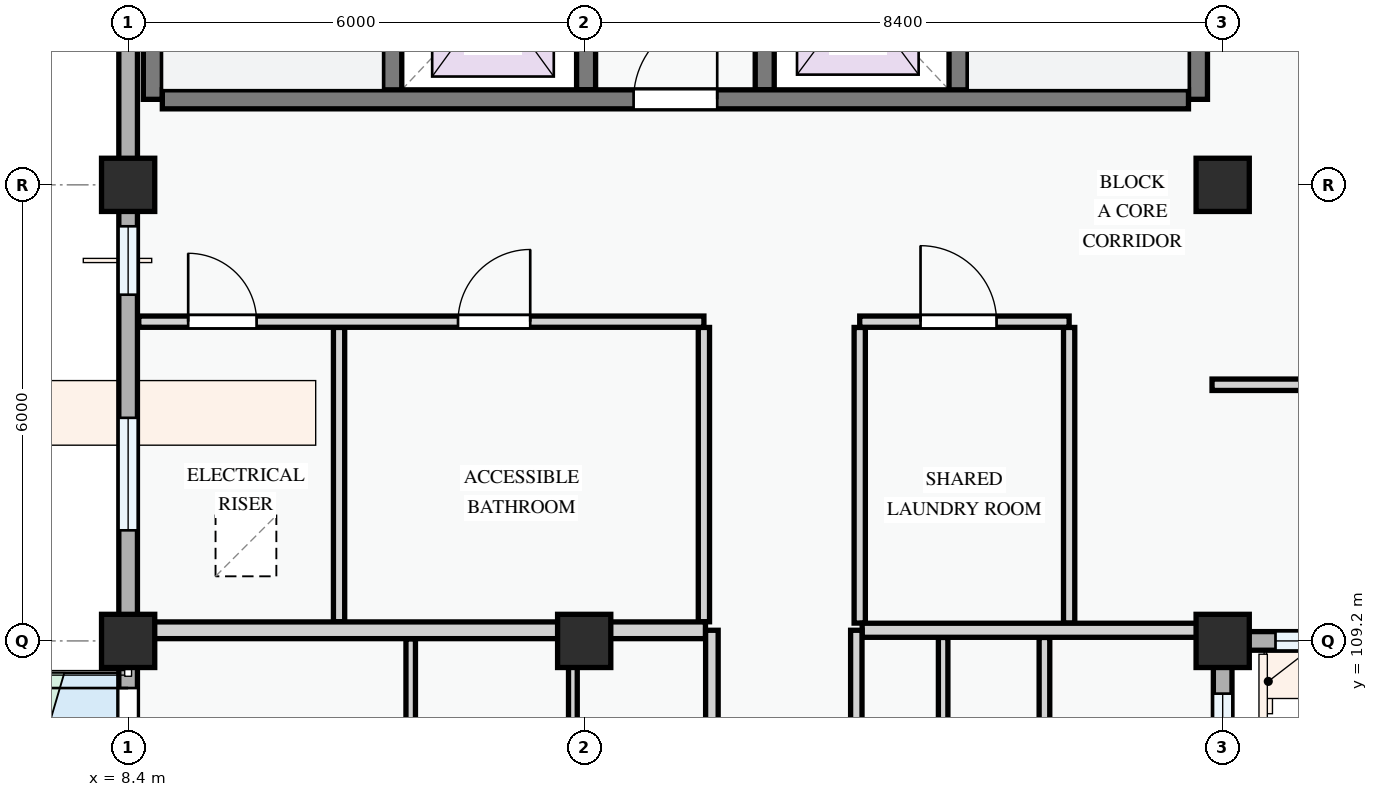
"""IFC4 building model, lengths in metres.
Left out: names, types, materials, properties, quantities, classifications, styles, units other than length and angle.
Written with IfcOpenShell. Run it as: python <this file> out.ifc"""

import sys

from ifc_helpers import new_model, si_unit, direction, frame, frame_2d, origin, origin_2d, place, context, subcontext, project, spatial, rectangle, extrude, element, fill, save


model = new_model("IFC4")
c1 = context("Model", 3, precision=1e-05, world=origin(), true_north=direction((0.0, 1.0)))
c2 = subcontext(c1, "Body", "Model", "MODEL_VIEW")
j1 = project(units=[si_unit("LENGTHUNIT", "METRE"), si_unit("PLANEANGLEUNIT", "RADIAN")], contexts=[c1])
p1 = place(None, origin())
s1 = spatial("IfcSite", under=j1, at=p1, CompositionType="ELEMENT")
p2 = place(p1, origin())
s2 = spatial("IfcBuilding", under=s1, at=p2, CompositionType="ELEMENT")
p3 = place(p2, frame((0.0, 0.0, 8.1)))
s3 = spatial("IfcBuildingStorey", under=s2, at=p3, CompositionType="ELEMENT", Elevation=8.1)
for number, where, z_axis, x_axis in (
    (1, (8.4, 109.2, 0.0), (0.0, 0.0, 1.0), (1.0, 0.0, 0.0)),
    (2, (8.4, 115.2, 0.0), (0.0, 0.0, 1.0), (1.0, 0.0, 0.0)),
    (3, (14.4, 109.2, 0.0), (0.0, 0.0, 1.0), (1.0, 0.0, 0.0)),
    (4, (22.8, 109.2, 0.0), (0.0, 0.0, 1.0), (1.0, 0.0, 0.0)),
    (5, (22.8, 115.2, 0.0), (0.0, 0.0, 1.0), (1.0, 0.0, 0.0)),
):
    element("IfcColumn", number, at=place(p3, frame(where, z_axis=z_axis, x_axis=x_axis)), inside=s3, PredefinedType="COLUMN", context=c2, shape_type="SweptSolid", body=[
        extrude(rectangle(XDim=0.7, YDim=0.7, at=origin_2d()), origin(), (0.0, 0.0, 1.0), 3.3),
    ])
p4 = place(p3, frame((22.8, 109.2, 0.0), z_axis=(0.0, 0.0, 1.0), x_axis=(1.0, 0.0, 0.0)))
e6 = element("IfcWall", 6, at=p4, inside=s3, PredefinedType="STANDARD", context=c2, shape_type="SweptSolid", body=[
    extrude(rectangle(XDim=6.0, YDim=0.245, at=frame_2d((3.0, 0.0))), origin(), (0.0, 0.0, 1.0), 2.475),
])
p5 = place(p4, frame((0.695, 0.0, 0.78)))
e7 = element("IfcOpeningElement", 7, at=p5, cuts=e6, PredefinedType="OPENING", context=c2, shape_type="SweptSolid", body=[
    extrude(rectangle(XDim=1.15, YDim=1.25, at=frame_2d((0.575, 0.625))), frame((0.0, 0.133, 0.0), z_axis=(0.0, -1.0, 0.0), x_axis=(1.0, 0.0, 0.0)), (0.0, 0.0, 1.0), 0.265),
])
p6 = place(p4, frame((3.205, 0.0, 0.78)))
e8 = element("IfcOpeningElement", 8, at=p6, cuts=e6, PredefinedType="OPENING", context=c2, shape_type="SweptSolid", body=[
    extrude(rectangle(XDim=1.75, YDim=1.45, at=frame_2d((0.875, 0.725))), frame((0.0, 0.133, 0.0), z_axis=(0.0, -1.0, 0.0), x_axis=(1.0, 0.0, 0.0)), (0.0, 0.0, 1.0), 0.265),
])
p7 = place(p3, frame((8.4, 123.6, 0.0), z_axis=(0.0, 0.0, 1.0), x_axis=(0.0, -1.0, 0.0)))
e9 = element("IfcWall", 9, at=p7, inside=s3, PredefinedType="STANDARD", context=c2, shape_type="SweptSolid", body=[
    extrude(rectangle(XDim=8.4, YDim=0.245, at=frame_2d((4.2, 0.0))), origin(), (0.0, 0.0, 1.0), 2.345),
])
p8 = place(p7, frame((0.976, 0.0, 0.78)))
e10 = element("IfcOpeningElement", 10, at=p8, cuts=e9, PredefinedType="OPENING", context=c2, shape_type="SweptSolid", body=[
    extrude(rectangle(XDim=2.04, YDim=1.46, at=frame_2d((1.02, 0.73))), frame((0.0, 0.133, 0.0), z_axis=(0.0, -1.0, 0.0), x_axis=(1.0, 0.0, 0.0)), (0.0, 0.0, 1.0), 0.265),
])
p9 = place(p7, frame((4.869, 0.0, 0.78)))
e11 = element("IfcOpeningElement", 11, at=p9, cuts=e9, PredefinedType="OPENING", context=c2, shape_type="SweptSolid", body=[
    extrude(rectangle(XDim=1.2, YDim=1.35, at=frame_2d((0.6, 0.675))), frame((0.0, 0.133, 0.0), z_axis=(0.0, -1.0, 0.0), x_axis=(1.0, 0.0, 0.0)), (0.0, 0.0, 1.0), 0.265),
])
p10 = place(p3, frame((8.4, 115.2, 0.0), z_axis=(0.0, 0.0, 1.0), x_axis=(0.0, -1.0, 0.0)))
e12 = element("IfcWall", 12, at=p10, inside=s3, PredefinedType="STANDARD", context=c2, shape_type="SweptSolid", body=[
    extrude(rectangle(XDim=6.0, YDim=0.245, at=frame_2d((3.0, 0.0))), origin(), (0.0, 0.0, 1.0), 2.445),
])
p11 = place(p10, frame((0.545, 0.0, 0.78)))
e13 = element("IfcOpeningElement", 13, at=p11, cuts=e12, PredefinedType="OPENING", context=c2, shape_type="SweptSolid", body=[
    extrude(rectangle(XDim=0.9, YDim=1.2, at=frame_2d((0.45, 0.6))), frame((0.0, 0.133, 0.0), z_axis=(0.0, -1.0, 0.0), x_axis=(1.0, 0.0, 0.0)), (0.0, 0.0, 1.0), 0.265),
])
p12 = place(p10, frame((3.065, 0.0, 0.78)))
e14 = element("IfcOpeningElement", 14, at=p12, cuts=e12, PredefinedType="OPENING", context=c2, shape_type="SweptSolid", body=[
    extrude(rectangle(XDim=1.48, YDim=1.52, at=frame_2d((0.74, 0.76))), frame((0.0, 0.133, 0.0), z_axis=(0.0, -1.0, 0.0), x_axis=(1.0, 0.0, 0.0)), (0.0, 0.0, 1.0), 0.265),
])
p13 = place(p3, frame((8.4, 109.2, 0.0), z_axis=(0.0, 0.0, 1.0), x_axis=(0.0, -1.0, 0.0)))
e15 = element("IfcWall", 15, at=p13, inside=s3, PredefinedType="STANDARD", context=c2, shape_type="SweptSolid", body=[
    extrude(rectangle(XDim=8.4, YDim=0.245, at=frame_2d((4.2, 0.0))), origin(), (0.0, 0.0, 1.0), 2.345),
])
p14 = place(p13, frame((0.62, 0.0, 0.0)))
e16 = element("IfcOpeningElement", 16, at=p14, cuts=e15, PredefinedType="OPENING", context=c2, shape_type="SweptSolid", body=[
    extrude(rectangle(XDim=1.3, YDim=2.15, at=frame_2d((0.65, 1.075))), frame((0.0, 0.133, 0.0), z_axis=(0.0, -1.0, 0.0), x_axis=(1.0, 0.0, 0.0)), (0.0, 0.0, 1.0), 0.265),
])
p15 = place(p13, frame((3.198, 0.0, 0.78)))
e17 = element("IfcOpeningElement", 17, at=p15, cuts=e15, PredefinedType="OPENING", context=c2, shape_type="SweptSolid", body=[
    extrude(rectangle(XDim=1.4, YDim=1.45, at=frame_2d((0.7, 0.725))), frame((0.0, 0.133, 0.0), z_axis=(0.0, -1.0, 0.0), x_axis=(1.0, 0.0, 0.0)), (0.0, 0.0, 1.0), 0.265),
])
p16 = place(p13, frame((6.492, 0.0, 0.78)))
e18 = element("IfcOpeningElement", 18, at=p16, cuts=e15, PredefinedType="OPENING", context=c2, shape_type="SweptSolid", body=[
    extrude(rectangle(XDim=1.05, YDim=1.2, at=frame_2d((0.525, 0.6))), frame((0.0, 0.133, 0.0), z_axis=(0.0, -1.0, 0.0), x_axis=(1.0, 0.0, 0.0)), (0.0, 0.0, 1.0), 0.265),
])
p17 = place(p3, frame((22.8, 100.8, 0.0), z_axis=(0.0, 0.0, 1.0), x_axis=(0.0, 1.0, 0.0)))
e19 = element("IfcWall", 19, at=p17, inside=s3, PredefinedType="STANDARD", context=c2, shape_type="SweptSolid", body=[
    extrude(rectangle(XDim=8.4, YDim=0.245, at=frame_2d((4.2, 0.0))), origin(), (0.0, 0.0, 1.0), 2.425),
])
p18 = place(p17, frame((0.663, 0.0, 0.78)))
e20 = element("IfcOpeningElement", 20, at=p18, cuts=e19, PredefinedType="OPENING", context=c2, shape_type="SweptSolid", body=[
    extrude(rectangle(XDim=1.2, YDim=1.5, at=frame_2d((0.6, 0.75))), frame((0.0, 0.133, 0.0), z_axis=(0.0, -1.0, 0.0), x_axis=(1.0, 0.0, 0.0)), (0.0, 0.0, 1.0), 0.265),
])
p19 = place(p17, frame((3.19, 0.0, 0.78)))
e21 = element("IfcOpeningElement", 21, at=p19, cuts=e19, PredefinedType="OPENING", context=c2, shape_type="SweptSolid", body=[
    extrude(rectangle(XDim=1.3, YDim=1.4, at=frame_2d((0.65, 0.7))), frame((0.0, 0.133, 0.0), z_axis=(0.0, -1.0, 0.0), x_axis=(1.0, 0.0, 0.0)), (0.0, 0.0, 1.0), 0.265),
])
p20 = place(p17, frame((5.707, 0.0, 0.78)))
e22 = element("IfcOpeningElement", 22, at=p20, cuts=e19, PredefinedType="OPENING", context=c2, shape_type="SweptSolid", body=[
    extrude(rectangle(XDim=2.0, YDim=1.5, at=frame_2d((1.0, 0.75))), frame((0.0, 0.133, 0.0), z_axis=(0.0, -1.0, 0.0), x_axis=(1.0, 0.0, 0.0)), (0.0, 0.0, 1.0), 0.265),
])
p21 = place(p3, frame((11.875, 123.25, 0.0), z_axis=(0.0, 0.0, 1.0), x_axis=(0.0, -1.0, 0.0)))
e23 = element("IfcWall", 23, at=p21, inside=s3, PredefinedType="SHEAR", context=c2, shape_type="SweptSolid", body=[
    extrude(rectangle(XDim=6.925, YDim=0.25, at=frame_2d((3.462, 0.0))), origin(), (0.0, 0.0, 1.0), 3.0),
])
p22 = place(p21, frame((0.35, 0.0, 0.0)))
e24 = element("IfcOpeningElement", 24, at=p22, cuts=e23, PredefinedType="OPENING", context=c2, shape_type="SweptSolid", body=[
    extrude(rectangle(XDim=0.95, YDim=2.1, at=frame_2d((0.475, 1.05))), frame((0.0, 0.135, 0.0), z_axis=(0.0, -1.0, 0.0), x_axis=(1.0, 0.0, 0.0)), (0.0, 0.0, 1.0), 0.27),
])
p23 = place(p3, frame((8.725, 123.4, 0.0), z_axis=(0.0, 0.0, 1.0), x_axis=(0.0, -1.0, 0.0)))
e25 = element("IfcWall", 25, at=p23, inside=s3, PredefinedType="SHEAR", context=c2, shape_type="SweptSolid", body=[
    extrude(rectangle(XDim=7.075, YDim=0.25, at=frame_2d((3.538, 0.0))), origin(), (0.0, 0.0, 1.0), 3.0),
])
p24 = place(p3, frame((22.475, 123.25, 0.0), z_axis=(0.0, 0.0, 1.0), x_axis=(0.0, -1.0, 0.0)))
e26 = element("IfcWall", 26, at=p24, inside=s3, PredefinedType="SHEAR", context=c2, shape_type="SweptSolid", body=[
    extrude(rectangle(XDim=6.925, YDim=0.25, at=frame_2d((3.462, 0.0))), origin(), (0.0, 0.0, 1.0), 3.0),
])
p25 = place(p3, frame((19.325, 123.25, 0.0), z_axis=(0.0, 0.0, 1.0), x_axis=(0.0, -1.0, 0.0)))
e27 = element("IfcWall", 27, at=p25, inside=s3, PredefinedType="SHEAR", context=c2, shape_type="SweptSolid", body=[
    extrude(rectangle(XDim=6.925, YDim=0.25, at=frame_2d((3.462, 0.0))), origin(), (0.0, 0.0, 1.0), 3.0),
])
p26 = place(p25, frame((0.35, 0.0, 0.0)))
e28 = element("IfcOpeningElement", 28, at=p26, cuts=e27, PredefinedType="OPENING", context=c2, shape_type="SweptSolid", body=[
    extrude(rectangle(XDim=0.95, YDim=2.1, at=frame_2d((0.475, 1.05))), frame((0.0, 0.135, 0.0), z_axis=(0.0, -1.0, 0.0), x_axis=(1.0, 0.0, 0.0)), (0.0, 0.0, 1.0), 0.27),
])
for number, where, z_axis, x_axis in (
    (29, (14.425, 118.875, 0.0), (0.0, 0.0, 1.0), (0.0, -1.0, 0.0)),
    (30, (16.775, 118.875, 0.0), (0.0, 0.0, 1.0), (0.0, -1.0, 0.0)),
):
    element("IfcWall", number, at=place(p3, frame(where, z_axis=z_axis, x_axis=x_axis)), inside=s3, PredefinedType="SHEAR", context=c2, shape_type="SweptSolid", body=[
        extrude(rectangle(XDim=2.425, YDim=0.25, at=frame_2d((1.212, 0.0))), origin(), (0.0, 0.0, 1.0), 3.0),
    ])
p27 = place(p3, frame((8.85, 116.325, 0.0), z_axis=(0.0, 0.0, 1.0), x_axis=(1.0, 0.0, 0.0)))
e31 = element("IfcWall", 31, at=p27, inside=s3, PredefinedType="SHEAR", context=c2, shape_type="SweptSolid", body=[
    extrude(rectangle(XDim=13.5, YDim=0.25, at=frame_2d((6.75, 0.0))), origin(), (0.0, 0.0, 1.0), 3.0),
])
p28 = place(p27, frame((6.2, 0.0, 0.0)))
e32 = element("IfcOpeningElement", 32, at=p28, cuts=e31, PredefinedType="OPENING", context=c2, shape_type="SweptSolid", body=[
    extrude(rectangle(XDim=1.1, YDim=2.15, at=frame_2d((0.55, 1.075))), frame((0.0, 0.135, 0.0), z_axis=(0.0, -1.0, 0.0), x_axis=(1.0, 0.0, 0.0)), (0.0, 0.0, 1.0), 0.27),
])
for number, where, z_axis, x_axis in (
    (33, (11.175, 113.324, 0.0), (0.0, 0.0, 1.0), (0.0, -1.0, 0.0)),
    (34, (15.975, 113.324, 0.0), (0.0, 0.0, 1.0), (0.0, -1.0, 0.0)),
):
    element("IfcWall", number, at=place(p3, frame(where, z_axis=z_axis, x_axis=x_axis)), inside=s3, PredefinedType="PARTITIONING", context=c2, shape_type="SweptSolid", body=[
        extrude(rectangle(XDim=3.872, YDim=0.148, at=frame_2d((1.936, 0.0))), origin(), (0.0, 0.0, 1.0), 3.0),
    ])
for number, where, z_axis, x_axis in (
    (35, (18.025, 113.324, 0.0), (0.0, 0.0, 1.0), (0.0, -1.0, 0.0)),
    (36, (20.78, 113.324, 0.0), (0.0, 0.0, 1.0), (0.0, -1.0, 0.0)),
):
    element("IfcWall", number, at=place(p3, frame(where, z_axis=z_axis, x_axis=x_axis)), inside=s3, PredefinedType="PARTITIONING", context=c2, shape_type="SweptSolid", body=[
        extrude(rectangle(XDim=3.889, YDim=0.148, at=frame_2d((1.945, 0.0))), origin(), (0.0, 0.0, 1.0), 3.0),
    ])
p29 = place(p3, frame((8.54, 113.4, 0.0), z_axis=(0.0, 0.0, 1.0), x_axis=(1.0, 0.0, 0.0)))
e37 = element("IfcWall", 37, at=p29, inside=s3, PredefinedType="PARTITIONING", context=c2, shape_type="SweptSolid", body=[
    extrude(rectangle(XDim=7.435, YDim=0.148, at=frame_2d((3.718, 0.0))), origin(), (0.0, 0.0, 1.0), 3.0),
])
p30 = place(p29, frame((0.65, 0.0, 0.0)))
e38 = element("IfcOpeningElement", 38, at=p30, cuts=e37, PredefinedType="OPENING", context=c2, shape_type="SweptSolid", body=[
    extrude(rectangle(XDim=0.9, YDim=2.1, at=frame_2d((0.45, 1.05))), frame((0.0, 0.084, 0.0), z_axis=(0.0, -1.0, 0.0), x_axis=(1.0, 0.0, 0.0)), (0.0, 0.0, 1.0), 0.168),
])
p31 = place(p29, frame((4.2, 0.0, 0.0)))
e39 = element("IfcOpeningElement", 39, at=p31, cuts=e37, PredefinedType="OPENING", context=c2, shape_type="SweptSolid", body=[
    extrude(rectangle(XDim=0.95, YDim=2.1, at=frame_2d((0.475, 1.05))), frame((0.0, 0.084, 0.0), z_axis=(0.0, -1.0, 0.0), x_axis=(1.0, 0.0, 0.0)), (0.0, 0.0, 1.0), 0.168),
])
p32 = place(p3, frame((18.025, 113.4, 0.0), z_axis=(0.0, 0.0, 1.0), x_axis=(1.0, 0.0, 0.0)))
e40 = element("IfcWall", 40, at=p32, inside=s3, PredefinedType="PARTITIONING", context=c2, shape_type="SweptSolid", body=[
    extrude(rectangle(XDim=2.755, YDim=0.148, at=frame_2d((1.377, 0.0))), origin(), (0.0, 0.0, 1.0), 3.0),
])
p33 = place(p32, frame((0.8, 0.0, 0.0)))
e41 = element("IfcOpeningElement", 41, at=p33, cuts=e40, PredefinedType="OPENING", context=c2, shape_type="SweptSolid", body=[
    extrude(rectangle(XDim=1.0, YDim=2.15, at=frame_2d((0.5, 1.075))), frame((0.0, 0.084, 0.0), z_axis=(0.0, -1.0, 0.0), x_axis=(1.0, 0.0, 0.0)), (0.0, 0.0, 1.0), 0.168),
])
p34 = place(p3, frame((22.66, 112.57, 0.0), z_axis=(0.0, 0.0, 1.0), x_axis=(1.0, 0.0, 0.0)))
e42 = element("IfcWall", 42, at=p34, inside=s3, PredefinedType="PARTITIONING", context=c2, shape_type="SweptSolid", body=[
    extrude(rectangle(XDim=2.406, YDim=0.15, at=frame_2d((1.203, 0.0))), origin(), (0.0, 0.0, 1.0), 3.0),
])
p35 = place(p3, frame((12.118, 103.447, 0.0), z_axis=(0.0, 0.0, 1.0), x_axis=(0.0, 1.0, 0.0)))
e43 = element("IfcWall", 43, at=p35, inside=s3, PredefinedType="PARTITIONING", context=c2, shape_type="SweptSolid", body=[
    extrude(rectangle(XDim=5.781, YDim=0.125, at=frame_2d((2.891, 0.0))), origin(), (0.0, 0.0, 1.0), 3.0),
])
p36 = place(p3, frame((14.251, 103.447, 0.0), z_axis=(0.0, 0.0, 1.0), x_axis=(0.0, 1.0, 0.0)))
e44 = element("IfcWall", 44, at=p36, inside=s3, PredefinedType="PARTITIONING", context=c2, shape_type="SweptSolid", body=[
    extrude(rectangle(XDim=5.781, YDim=0.115, at=frame_2d((2.891, 0.0))), origin(), (0.0, 0.0, 1.0), 2.425),
])
p37 = place(p3, frame((20.455, 103.188, 0.0), z_axis=(0.0, 0.0, 1.0), x_axis=(0.0, 1.0, 0.0)))
e45 = element("IfcWall", 45, at=p37, inside=s3, PredefinedType="PARTITIONING", context=c2, shape_type="SweptSolid", body=[
    extrude(rectangle(XDim=6.057, YDim=0.14, at=frame_2d((3.029, 0.0))), origin(), (0.0, 0.0, 1.0), 3.0),
])
p38 = place(p3, frame((19.122, 103.188, 0.0), z_axis=(0.0, 0.0, 1.0), x_axis=(0.0, 1.0, 0.0)))
e46 = element("IfcWall", 46, at=p38, inside=s3, PredefinedType="PARTITIONING", context=c2, shape_type="SweptSolid", body=[
    extrude(rectangle(XDim=6.057, YDim=0.125, at=frame_2d((3.029, 0.0))), origin(), (0.0, 0.0, 1.0), 3.0),
])
p39 = place(p3, frame((8.524, 109.34, 0.0), z_axis=(0.0, 0.0, 1.0), x_axis=(1.0, 0.0, 0.0)))
e47 = element("IfcWall", 47, at=p39, inside=s3, PredefinedType="PARTITIONING", context=c2, shape_type="SweptSolid", body=[
    extrude(rectangle(XDim=7.471, YDim=0.22, at=frame_2d((3.736, 0.0))), origin(), (0.0, 0.0, 1.0), 2.375),
])
p40 = place(p3, frame((18.057, 109.34, 0.0), z_axis=(0.0, 0.0, 1.0), x_axis=(1.0, 0.0, 0.0)))
e48 = element("IfcWall", 48, at=p40, inside=s3, PredefinedType="PARTITIONING", context=c2, shape_type="SweptSolid", body=[
    extrude(rectangle(XDim=4.683, YDim=0.185, at=frame_2d((2.342, 0.0))), origin(), (0.0, 0.0, 1.0), 2.375),
])
p41 = place(p3, frame((16.08, 72.125, 0.0), z_axis=(0.0, 0.0, 1.0), x_axis=(0.0, 1.0, 0.0)))
e49 = element("IfcWall", 49, at=p41, inside=s3, PredefinedType="PARTITIONING", context=c2, shape_type="SweptSolid", body=[
    extrude(rectangle(XDim=37.216, YDim=0.165, at=frame_2d((18.608, 0.0))), origin(), (0.0, 0.0, 1.0), 3.0),
])
p42 = place(p41, frame((3.657, 0.0, 0.0)))
e50 = element("IfcOpeningElement", 50, at=p42, cuts=e49, PredefinedType="OPENING", context=c2, shape_type="SweptSolid", body=[
    extrude(rectangle(XDim=0.96, YDim=2.12, at=frame_2d((0.48, 1.06))), frame((0.0, 0.093, 0.0), z_axis=(0.0, -1.0, 0.0), x_axis=(1.0, 0.0, 0.0)), (0.0, 0.0, 1.0), 0.185),
])
p43 = place(p41, frame((17.69, 0.0, 0.0)))
e51 = element("IfcOpeningElement", 51, at=p43, cuts=e49, PredefinedType="OPENING", context=c2, shape_type="SweptSolid", body=[
    extrude(rectangle(XDim=0.92, YDim=2.1, at=frame_2d((0.46, 1.05))), frame((0.0, 0.093, 0.0), z_axis=(0.0, -1.0, 0.0), x_axis=(1.0, 0.0, 0.0)), (0.0, 0.0, 1.0), 0.185),
])
p44 = place(p41, frame((25.535, 0.0, 0.0)))
e52 = element("IfcOpeningElement", 52, at=p44, cuts=e49, PredefinedType="OPENING", context=c2, shape_type="SweptSolid", body=[
    extrude(rectangle(XDim=0.92, YDim=2.1, at=frame_2d((0.46, 1.05))), frame((0.0, 0.093, 0.0), z_axis=(0.0, -1.0, 0.0), x_axis=(1.0, 0.0, 0.0)), (0.0, 0.0, 1.0), 0.185),
])
p45 = place(p3, frame((17.98, 72.125, 0.0), z_axis=(0.0, 0.0, 1.0), x_axis=(0.0, 1.0, 0.0)))
e53 = element("IfcWall", 53, at=p45, inside=s3, PredefinedType="PARTITIONING", context=c2, shape_type="SweptSolid", body=[
    extrude(rectangle(XDim=37.216, YDim=0.15, at=frame_2d((18.608, 0.0))), origin(), (0.0, 0.0, 1.0), 3.0),
])
p46 = place(p45, frame((3.619, 0.0, 0.0)))
e54 = element("IfcOpeningElement", 54, at=p46, cuts=e53, PredefinedType="OPENING", context=c2, shape_type="SweptSolid", body=[
    extrude(rectangle(XDim=0.92, YDim=2.1, at=frame_2d((0.46, 1.05))), frame((0.0, 0.085, 0.0), z_axis=(0.0, -1.0, 0.0), x_axis=(1.0, 0.0, 0.0)), (0.0, 0.0, 1.0), 0.17),
])
p47 = place(p45, frame((17.435, 0.0, 0.0)))
e55 = element("IfcOpeningElement", 55, at=p47, cuts=e53, PredefinedType="OPENING", context=c2, shape_type="SweptSolid", body=[
    extrude(rectangle(XDim=0.92, YDim=2.1, at=frame_2d((0.46, 1.05))), frame((0.0, 0.085, 0.0), z_axis=(0.0, -1.0, 0.0), x_axis=(1.0, 0.0, 0.0)), (0.0, 0.0, 1.0), 0.17),
])
p48 = place(p45, frame((25.535, 0.0, 0.0)))
e56 = element("IfcOpeningElement", 56, at=p48, cuts=e53, PredefinedType="OPENING", context=c2, shape_type="SweptSolid", body=[
    extrude(rectangle(XDim=0.96, YDim=2.12, at=frame_2d((0.48, 1.06))), frame((0.0, 0.085, 0.0), z_axis=(0.0, -1.0, 0.0), x_axis=(1.0, 0.0, 0.0)), (0.0, 0.0, 1.0), 0.17),
])
p49 = place(p5, origin())
e57 = element("IfcWindow", 57, at=p49, inside=s3, PartitioningType="SINGLE_PANEL", PredefinedType="WINDOW", context=c2, shape_type="SweptSolid", body=[
    extrude(rectangle(XDim=1.15, YDim=1.25, at=frame_2d((0.575, 0.625))), frame((0.0, 0.03, 0.0), z_axis=(0.0, -1.0, 0.0), x_axis=(1.0, 0.0, 0.0)), (0.0, 0.0, 1.0), 0.06),
])
fill(e7, e57)
p50 = place(p11, origin())
e58 = element("IfcWindow", 58, at=p50, inside=s3, PartitioningType="SINGLE_PANEL", PredefinedType="WINDOW", context=c2, shape_type="SweptSolid", body=[
    extrude(rectangle(XDim=0.9, YDim=1.2, at=frame_2d((0.45, 0.6))), frame((0.0, 0.03, 0.0), z_axis=(0.0, -1.0, 0.0), x_axis=(1.0, 0.0, 0.0)), (0.0, 0.0, 1.0), 0.06),
])
fill(e13, e58)
p51 = place(p12, origin())
e59 = element("IfcWindow", 59, at=p51, inside=s3, PartitioningType="SINGLE_PANEL", PredefinedType="WINDOW", context=c2, shape_type="SweptSolid", body=[
    extrude(rectangle(XDim=1.48, YDim=1.52, at=frame_2d((0.74, 0.76))), frame((0.0, 0.03, 0.0), z_axis=(0.0, -1.0, 0.0), x_axis=(1.0, 0.0, 0.0)), (0.0, 0.0, 1.0), 0.06),
])
fill(e14, e59)
p52 = place(p14, frame((1.3, 0.0, 0.0), z_axis=(0.0, 0.0, 1.0), x_axis=(-1.0, 0.0, 0.0)))
e60 = element("IfcDoor", 60, at=p52, inside=s3, OperationType="SINGLE_SWING_RIGHT", PredefinedType="DOOR", context=c2, shape_type="SweptSolid", body=[
    extrude(rectangle(XDim=1.3, YDim=2.15, at=frame_2d((0.65, 1.075))), frame((0.0, 0.025, 0.0), z_axis=(0.0, -1.0, 0.0), x_axis=(1.0, 0.0, 0.0)), (0.0, 0.0, 1.0), 0.05),
])
fill(e16, e60)
p53 = place(p20, origin())
e61 = element("IfcWindow", 61, at=p53, inside=s3, PartitioningType="DOUBLE_PANEL_VERTICAL", PredefinedType="WINDOW", context=c2, shape_type="SweptSolid", body=[
    extrude(rectangle(XDim=2.0, YDim=1.5, at=frame_2d((1.0, 0.75))), frame((0.0, 0.03, 0.0), z_axis=(0.0, -1.0, 0.0), x_axis=(1.0, 0.0, 0.0)), (0.0, 0.0, 1.0), 0.06),
])
fill(e22, e61)
p54 = place(p28, origin())
e62 = element("IfcDoor", 62, at=p54, inside=s3, OperationType="SINGLE_SWING_RIGHT", PredefinedType="DOOR", context=c2, shape_type="SweptSolid", body=[
    extrude(rectangle(XDim=1.1, YDim=2.15, at=frame_2d((0.55, 1.075))), frame((0.0, 0.025, 0.0), z_axis=(0.0, -1.0, 0.0), x_axis=(1.0, 0.0, 0.0)), (0.0, 0.0, 1.0), 0.05),
])
fill(e32, e62)
p55 = place(p30, origin())
e63 = element("IfcDoor", 63, at=p55, inside=s3, OperationType="SINGLE_SWING_LEFT", PredefinedType="DOOR", context=c2, shape_type="SweptSolid", body=[
    extrude(rectangle(XDim=0.9, YDim=2.1, at=frame_2d((0.45, 1.05))), frame((0.0, 0.025, 0.0), z_axis=(0.0, -1.0, 0.0), x_axis=(1.0, 0.0, 0.0)), (0.0, 0.0, 1.0), 0.05),
])
fill(e38, e63)
p56 = place(p31, origin())
e64 = element("IfcDoor", 64, at=p56, inside=s3, OperationType="SINGLE_SWING_RIGHT", PredefinedType="DOOR", context=c2, shape_type="SweptSolid", body=[
    extrude(rectangle(XDim=0.95, YDim=2.1, at=frame_2d((0.475, 1.05))), frame((0.0, 0.025, 0.0), z_axis=(0.0, -1.0, 0.0), x_axis=(1.0, 0.0, 0.0)), (0.0, 0.0, 1.0), 0.05),
])
fill(e39, e64)
p57 = place(p33, origin())
e65 = element("IfcDoor", 65, at=p57, inside=s3, OperationType="SINGLE_SWING_LEFT", PredefinedType="DOOR", context=c2, shape_type="SweptSolid", body=[
    extrude(rectangle(XDim=1.0, YDim=2.15, at=frame_2d((0.5, 1.075))), frame((0.0, 0.025, 0.0), z_axis=(0.0, -1.0, 0.0), x_axis=(1.0, 0.0, 0.0)), (0.0, 0.0, 1.0), 0.05),
])
fill(e41, e65)
save(model, sys.argv[1])
